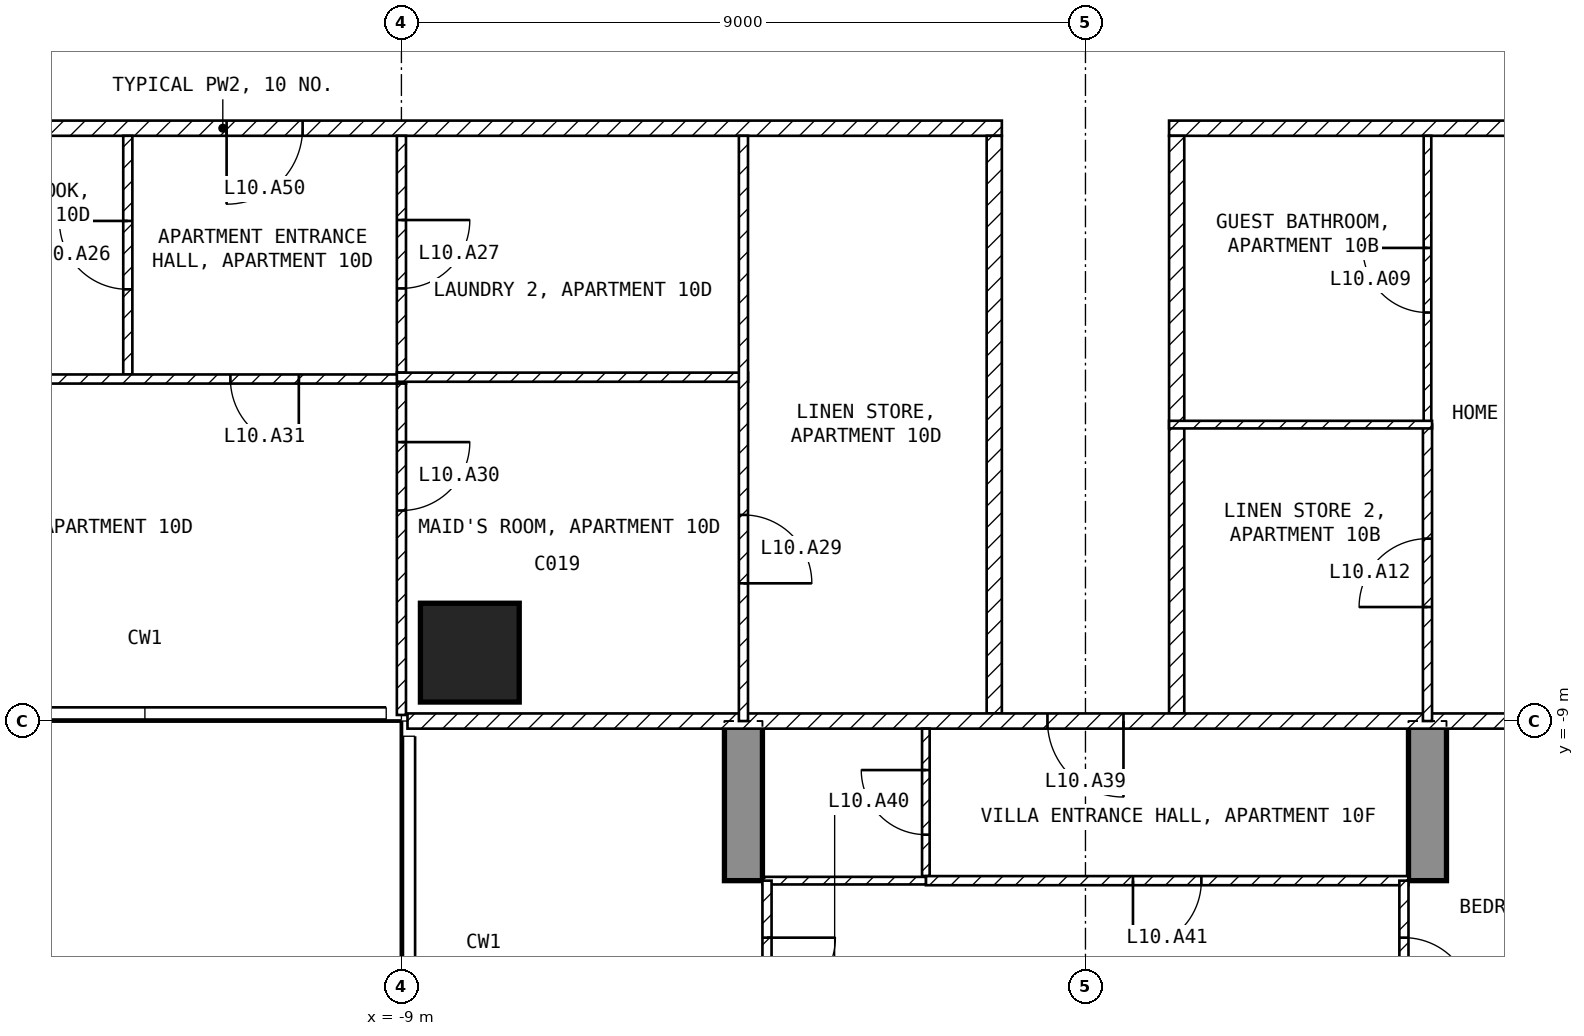
"""IFC4 building model, lengths in metres.
Left out: names, types, materials, properties, quantities, classifications, styles, units other than length and angle.
Written with IfcOpenShell. Run it as: python <this file> out.ifc"""

import sys

from ifc_helpers import new_model, si_unit, direction, frame, frame_2d, origin, origin_2d, place, context, subcontext, project, spatial, polyline, rectangle, outline, extrude, element, fill, save


model = new_model("IFC4")
c1 = context("Model", 3, precision=1e-05, world=origin(), true_north=direction((0.0, 1.0)))
c2 = subcontext(c1, "Body", "Model", "MODEL_VIEW")
j1 = project(units=[si_unit("LENGTHUNIT", "METRE"), si_unit("PLANEANGLEUNIT", "RADIAN")], contexts=[c1])
p1 = place(None, origin())
s1 = spatial("IfcSite", under=j1, at=p1, CompositionType="ELEMENT")
p2 = place(p1, origin())
s2 = spatial("IfcBuilding", under=s1, at=p2, CompositionType="ELEMENT")
p3 = place(p2, frame((0.0, 0.0, 54.0)))
s3 = spatial("IfcBuildingStorey", under=s2, at=p3, CompositionType="ELEMENT", Elevation=54.0)
p4 = place(p3, frame((-8.1, -8.1, -0.25), z_axis=(0.0, 0.0, 1.0), x_axis=(1.0, 0.0, 0.0)))
e1 = element("IfcColumn", 1, at=p4, inside=s3, PredefinedType="COLUMN", context=c2, shape_type="SweptSolid", body=[
    extrude(rectangle(XDim=1.3, YDim=1.3, at=origin_2d()), origin(), (0.0, 0.0, 1.0), 3.5),
])
for number, where, z_axis, x_axis in (
    (2, (-4.75, -25.45, -0.25), (1.0, 0.0, 0.0), (0.0, 1.0, 0.0)),
    (3, (4.25, -25.45, -0.25), (1.0, 0.0, 0.0), (0.0, 1.0, 0.0)),
):
    element("IfcWall", number, at=place(p3, frame(where, z_axis=z_axis, x_axis=x_axis)), inside=s3, PredefinedType="SHEAR", context=c2, shape_type="SweptSolid", body=[
        extrude(outline(polyline([(0.0, 0.0), (4.15, 0.0), (4.15, 2.65), (6.55, 2.65), (6.55, 0.0), (11.95, 0.0), (11.95, 2.65), (14.35, 2.65), (14.35, 0.0), (16.45, 0.0), (16.45, 3.5), (0.0, 3.5), (0.0, 0.0)])), origin(), (0.0, 0.0, 1.0), 0.5),
    ])
p5 = place(p3, frame((21.6, -1.2, 0.0), z_axis=(0.0, 0.0, 1.0), x_axis=(-1.0, 0.0, 0.0)))
e4 = element("IfcWall", 4, at=p5, inside=s3, PredefinedType="PARTITIONING", context=c2, shape_type="SweptSolid", body=[
    extrude(rectangle(XDim=20.5, YDim=0.2, at=frame_2d((10.25, 0.0))), origin(), (0.0, 0.0, 1.0), 3.25),
])
p6 = place(p5, frame((7.9, 0.0, 0.0)))
e5 = element("IfcOpeningElement", 5, at=p6, cuts=e4, PredefinedType="OPENING", context=c2, shape_type="SweptSolid", body=[
    extrude(rectangle(XDim=1.0, YDim=2.1, at=frame_2d((0.5, 1.05))), frame((0.0, 0.11, 0.0), z_axis=(0.0, -1.0, 0.0), x_axis=(1.0, 0.0, 0.0)), (0.0, 0.0, 1.0), 0.22),
])
p7 = place(p3, frame((1.2, -1.3, 0.0), z_axis=(0.0, 0.0, 1.0), x_axis=(0.0, -1.0, 0.0)))
e6 = element("IfcWall", 6, at=p7, inside=s3, PredefinedType="PARTITIONING", context=c2, shape_type="SweptSolid", body=[
    extrude(rectangle(XDim=7.6, YDim=0.2, at=frame_2d((3.8, 0.0))), origin(), (0.0, 0.0, 1.0), 3.25),
])
p8 = place(p3, frame((-1.1, -1.2, 0.0), z_axis=(0.0, 0.0, 1.0), x_axis=(-1.0, 0.0, 0.0)))
e7 = element("IfcWall", 7, at=p8, inside=s3, PredefinedType="PARTITIONING", context=c2, shape_type="SweptSolid", body=[
    extrude(rectangle(XDim=20.5, YDim=0.2, at=frame_2d((10.25, 0.0))), origin(), (0.0, 0.0, 1.0), 3.25),
])
p9 = place(p8, frame((9.2, 0.0, 0.0)))
e8 = element("IfcOpeningElement", 8, at=p9, cuts=e7, PredefinedType="OPENING", context=c2, shape_type="SweptSolid", body=[
    extrude(rectangle(XDim=1.0, YDim=2.1, at=frame_2d((0.5, 1.05))), frame((0.0, 0.11, 0.0), z_axis=(0.0, -1.0, 0.0), x_axis=(1.0, 0.0, 0.0)), (0.0, 0.0, 1.0), 0.22),
])
p10 = place(p3, frame((-1.2, -8.9, 0.0), z_axis=(0.0, 0.0, 1.0), x_axis=(0.0, 1.0, 0.0)))
e9 = element("IfcWall", 9, at=p10, inside=s3, PredefinedType="PARTITIONING", context=c2, shape_type="SweptSolid", body=[
    extrude(rectangle(XDim=7.6, YDim=0.2, at=frame_2d((3.8, 0.0))), origin(), (0.0, 0.0, 1.0), 3.25),
])
p11 = place(p3, frame((8.92, -9.0, 0.0), z_axis=(0.0, 0.0, 1.0), x_axis=(-1.0, 0.0, 0.0)))
e10 = element("IfcWall", 10, at=p11, inside=s3, PredefinedType="PARTITIONING", context=c2, shape_type="SweptSolid", body=[
    extrude(rectangle(XDim=17.84, YDim=0.2, at=frame_2d((8.92, 0.0))), origin(), (0.0, 0.0, 1.0), 3.25),
])
p12 = place(p11, frame((8.42, 0.0, 0.0)))
e11 = element("IfcOpeningElement", 11, at=p12, cuts=e10, PredefinedType="OPENING", context=c2, shape_type="SweptSolid", body=[
    extrude(rectangle(XDim=1.0, YDim=2.1, at=frame_2d((0.5, 1.05))), frame((0.0, 0.11, 0.0), z_axis=(0.0, -1.0, 0.0), x_axis=(1.0, 0.0, 0.0)), (0.0, 0.0, 1.0), 0.22),
])
p13 = place(p3, frame((4.5, -5.1, 0.0), z_axis=(0.0, 0.0, 1.0), x_axis=(0.0, 1.0, 0.0)))
e12 = element("IfcWall", 12, at=p13, inside=s3, PredefinedType="PARTITIONING", context=c2, shape_type="SweptSolid", body=[
    extrude(rectangle(XDim=3.8, YDim=0.1, at=frame_2d((1.9, 0.0))), origin(), (0.0, 0.0, 1.0), 3.25),
])
p14 = place(p13, frame((1.475, 0.0, 0.0)))
e13 = element("IfcOpeningElement", 13, at=p14, cuts=e12, PredefinedType="OPENING", context=c2, shape_type="SweptSolid", body=[
    extrude(rectangle(XDim=0.85, YDim=2.1, at=frame_2d((0.425, 1.05))), frame((0.0, 0.06, 0.0), z_axis=(0.0, -1.0, 0.0), x_axis=(1.0, 0.0, 0.0)), (0.0, 0.0, 1.0), 0.12),
])
p15 = place(p3, frame((4.5, -9.0, 0.0), z_axis=(0.0, 0.0, 1.0), x_axis=(0.0, 1.0, 0.0)))
e14 = element("IfcWall", 14, at=p15, inside=s3, PredefinedType="PARTITIONING", context=c2, shape_type="SweptSolid", body=[
    extrude(rectangle(XDim=3.9, YDim=0.12, at=frame_2d((1.95, 0.0))), origin(), (0.0, 0.0, 1.0), 3.25),
])
p16 = place(p15, frame((1.5, 0.0, 0.0)))
e15 = element("IfcOpeningElement", 15, at=p16, cuts=e14, PredefinedType="OPENING", context=c2, shape_type="SweptSolid", body=[
    extrude(rectangle(XDim=0.9, YDim=2.1, at=frame_2d((0.45, 1.05))), frame((0.0, 0.07, 0.0), z_axis=(0.0, -1.0, 0.0), x_axis=(1.0, 0.0, 0.0)), (0.0, 0.0, 1.0), 0.14),
])
p17 = place(p3, frame((4.56, -5.1, 0.0), z_axis=(0.0, 0.0, 1.0), x_axis=(-1.0, 0.0, 0.0)))
e16 = element("IfcWall", 16, at=p17, inside=s3, PredefinedType="PARTITIONING", context=c2, shape_type="SweptSolid", body=[
    extrude(rectangle(XDim=3.46, YDim=0.1, at=frame_2d((1.73, 0.0))), origin(), (0.0, 0.0, 1.0), 3.25),
])
p18 = place(p3, frame((-12.6, -4.44, 0.0), z_axis=(0.0, 0.0, 1.0), x_axis=(0.0, 1.0, 0.0)))
e17 = element("IfcWall", 17, at=p18, inside=s3, PredefinedType="PARTITIONING", context=c2, shape_type="SweptSolid", body=[
    extrude(rectangle(XDim=3.14, YDim=0.12, at=frame_2d((1.57, 0.0))), origin(), (0.0, 0.0, 1.0), 3.25),
])
p19 = place(p18, frame((1.12, 0.0, 0.0)))
e18 = element("IfcOpeningElement", 18, at=p19, cuts=e17, PredefinedType="OPENING", context=c2, shape_type="SweptSolid", body=[
    extrude(rectangle(XDim=0.9, YDim=2.1, at=frame_2d((0.45, 1.05))), frame((0.0, 0.07, 0.0), z_axis=(0.0, -1.0, 0.0), x_axis=(1.0, 0.0, 0.0)), (0.0, 0.0, 1.0), 0.14),
])
p20 = place(p3, frame((-8.94, -4.5, 0.0), z_axis=(0.0, 0.0, 1.0), x_axis=(-1.0, 0.0, 0.0)))
e19 = element("IfcWall", 19, at=p20, inside=s3, PredefinedType="PARTITIONING", context=c2, shape_type="SweptSolid", body=[
    extrude(rectangle(XDim=8.46, YDim=0.12, at=frame_2d((4.23, 0.0))), origin(), (0.0, 0.0, 1.0), 3.25),
])
p21 = place(p20, frame((7.11, 0.0, 0.0)))
e20 = element("IfcOpeningElement", 20, at=p21, cuts=e19, PredefinedType="OPENING", context=c2, shape_type="SweptSolid", body=[
    extrude(rectangle(XDim=0.9, YDim=2.1, at=frame_2d((0.45, 1.05))), frame((0.0, 0.07, 0.0), z_axis=(0.0, -1.0, 0.0), x_axis=(1.0, 0.0, 0.0)), (0.0, 0.0, 1.0), 0.14),
])
p22 = place(p20, frame((1.41, 0.0, 0.0)))
e21 = element("IfcOpeningElement", 21, at=p22, cuts=e19, PredefinedType="OPENING", context=c2, shape_type="SweptSolid", body=[
    extrude(rectangle(XDim=0.9, YDim=2.1, at=frame_2d((0.45, 1.05))), frame((0.0, 0.07, 0.0), z_axis=(0.0, -1.0, 0.0), x_axis=(1.0, 0.0, 0.0)), (0.0, 0.0, 1.0), 0.14),
])
p23 = place(p3, frame((-9.0, -1.3, 0.0), z_axis=(0.0, 0.0, 1.0), x_axis=(0.0, -1.0, 0.0)))
e22 = element("IfcWall", 22, at=p23, inside=s3, PredefinedType="PARTITIONING", context=c2, shape_type="SweptSolid", body=[
    extrude(rectangle(XDim=3.116, YDim=0.12, at=frame_2d((1.558, 0.0))), origin(), (0.0, 0.0, 1.0), 3.25),
])
p24 = place(p23, frame((1.108, 0.0, 0.0)))
e23 = element("IfcOpeningElement", 23, at=p24, cuts=e22, PredefinedType="OPENING", context=c2, shape_type="SweptSolid", body=[
    extrude(rectangle(XDim=0.9, YDim=2.1, at=frame_2d((0.45, 1.05))), frame((0.0, 0.07, 0.0), z_axis=(0.0, -1.0, 0.0), x_axis=(1.0, 0.0, 0.0)), (0.0, 0.0, 1.0), 0.14),
])
p25 = place(p3, frame((-9.0, -4.56, 0.0), z_axis=(0.0, 0.0, 1.0), x_axis=(0.0, -1.0, 0.0)))
e24 = element("IfcWall", 24, at=p25, inside=s3, PredefinedType="PARTITIONING", context=c2, shape_type="SweptSolid", body=[
    extrude(rectangle(XDim=4.36, YDim=0.12, at=frame_2d((2.18, 0.0))), origin(), (0.0, 0.0, 1.0), 3.25),
])
p26 = place(p25, frame((0.77, 0.0, 0.0)))
e25 = element("IfcOpeningElement", 25, at=p26, cuts=e24, PredefinedType="OPENING", context=c2, shape_type="SweptSolid", body=[
    extrude(rectangle(XDim=0.9, YDim=2.1, at=frame_2d((0.45, 1.05))), frame((0.0, 0.07, 0.0), z_axis=(0.0, -1.0, 0.0), x_axis=(1.0, 0.0, 0.0)), (0.0, 0.0, 1.0), 0.14),
])
p27 = place(p3, frame((-4.44, -4.476, 0.0), z_axis=(0.0, 0.0, 1.0), x_axis=(-1.0, 0.0, 0.0)))
e26 = element("IfcWall", 26, at=p27, inside=s3, PredefinedType="PARTITIONING", context=c2, shape_type="SweptSolid", body=[
    extrude(rectangle(XDim=4.62, YDim=0.12, at=frame_2d((2.31, 0.0))), origin(), (0.0, 0.0, 1.0), 3.25),
])
p28 = place(p3, frame((-4.5, -1.3, 0.0), z_axis=(0.0, 0.0, 1.0), x_axis=(0.0, -1.0, 0.0)))
e27 = element("IfcWall", 27, at=p28, inside=s3, PredefinedType="PARTITIONING", context=c2, shape_type="SweptSolid", body=[
    extrude(rectangle(XDim=7.7, YDim=0.12, at=frame_2d((3.85, 0.0))), origin(), (0.0, 0.0, 1.0), 3.25),
])
p29 = place(p28, frame((4.988, 0.0, 0.0)))
e28 = element("IfcOpeningElement", 28, at=p29, cuts=e27, PredefinedType="OPENING", context=c2, shape_type="SweptSolid", body=[
    extrude(rectangle(XDim=0.9, YDim=2.1, at=frame_2d((0.45, 1.05))), frame((0.0, 0.07, 0.0), z_axis=(0.0, -1.0, 0.0), x_axis=(1.0, 0.0, 0.0)), (0.0, 0.0, 1.0), 0.14),
])
p30 = place(p3, frame((-2.1, -11.04, 0.0), z_axis=(0.0, 0.0, 1.0), x_axis=(0.0, 1.0, 0.0)))
e29 = element("IfcWall", 29, at=p30, inside=s3, PredefinedType="PARTITIONING", context=c2, shape_type="SweptSolid", body=[
    extrude(rectangle(XDim=1.94, YDim=0.1, at=frame_2d((0.97, 0.0))), origin(), (0.0, 0.0, 1.0), 3.25),
])
p31 = place(p30, frame((0.545, 0.0, 0.0)))
e30 = element("IfcOpeningElement", 30, at=p31, cuts=e29, PredefinedType="OPENING", context=c2, shape_type="SweptSolid", body=[
    extrude(rectangle(XDim=0.85, YDim=2.1, at=frame_2d((0.425, 1.05))), frame((0.0, 0.06, 0.0), z_axis=(0.0, -1.0, 0.0), x_axis=(1.0, 0.0, 0.0)), (0.0, 0.0, 1.0), 0.12),
])
p32 = place(p3, frame((4.25, -11.1, 0.0), z_axis=(0.0, 0.0, 1.0), x_axis=(-1.0, 0.0, 0.0)))
e31 = element("IfcWall", 31, at=p32, inside=s3, PredefinedType="PARTITIONING", context=c2, shape_type="SweptSolid", body=[
    extrude(rectangle(XDim=6.35, YDim=0.12, at=frame_2d((3.175, 0.0))), origin(), (0.0, 0.0, 1.0), 3.25),
])
p33 = place(p32, frame((2.725, 0.0, 0.0)))
e32 = element("IfcOpeningElement", 32, at=p33, cuts=e31, PredefinedType="OPENING", context=c2, shape_type="SweptSolid", body=[
    extrude(rectangle(XDim=0.9, YDim=2.1, at=frame_2d((0.45, 1.05))), frame((0.0, 0.07, 0.0), z_axis=(0.0, -1.0, 0.0), x_axis=(1.0, 0.0, 0.0)), (0.0, 0.0, 1.0), 0.14),
])
p34 = place(p3, frame((-2.1, -11.1, 0.0), z_axis=(0.0, 0.0, 1.0), x_axis=(-1.0, 0.0, 0.0)))
e33 = element("IfcWall", 33, at=p34, inside=s3, PredefinedType="PARTITIONING", context=c2, shape_type="SweptSolid", body=[
    extrude(rectangle(XDim=2.15, YDim=0.1, at=frame_2d((1.075, 0.0))), origin(), (0.0, 0.0, 1.0), 3.25),
])
p35 = place(p3, frame((4.19, -11.1, 0.0), z_axis=(0.0, 0.0, 1.0), x_axis=(0.0, -1.0, 0.0)))
e34 = element("IfcWall", 34, at=p35, inside=s3, PredefinedType="PARTITIONING", context=c2, shape_type="SweptSolid", body=[
    extrude(rectangle(XDim=2.4, YDim=0.12, at=frame_2d((1.2, 0.0))), origin(), (0.0, 0.0, 1.0), 2.4),
])
p36 = place(p35, frame((0.75, 0.0, 0.0)))
e35 = element("IfcOpeningElement", 35, at=p36, cuts=e34, PredefinedType="OPENING", context=c2, shape_type="SweptSolid", body=[
    extrude(rectangle(XDim=0.9, YDim=2.1, at=frame_2d((0.45, 1.05))), frame((0.0, 0.07, 0.0), z_axis=(0.0, -1.0, 0.0), x_axis=(1.0, 0.0, 0.0)), (0.0, 0.0, 1.0), 0.14),
])
p37 = place(p3, frame((-4.19, -11.1, 0.0), z_axis=(0.0, 0.0, 1.0), x_axis=(0.0, -1.0, 0.0)))
e36 = element("IfcWall", 36, at=p37, inside=s3, PredefinedType="PARTITIONING", context=c2, shape_type="SweptSolid", body=[
    extrude(rectangle(XDim=2.4, YDim=0.12, at=frame_2d((1.2, 0.0))), origin(), (0.0, 0.0, 1.0), 2.4),
])
p38 = place(p37, frame((0.75, 0.0, 0.0)))
e37 = element("IfcOpeningElement", 37, at=p38, cuts=e36, PredefinedType="OPENING", context=c2, shape_type="SweptSolid", body=[
    extrude(rectangle(XDim=0.9, YDim=2.1, at=frame_2d((0.45, 1.05))), frame((0.0, 0.07, 0.0), z_axis=(0.0, -1.0, 0.0), x_axis=(1.0, 0.0, 0.0)), (0.0, 0.0, 1.0), 0.14),
])
p39 = place(p14, origin())
e38 = element("IfcDoor", 38, at=p39, inside=s3, OperationType="SINGLE_SWING_RIGHT", PredefinedType="DOOR", context=c2, shape_type="SweptSolid", body=[
    extrude(rectangle(XDim=0.85, YDim=2.1, at=frame_2d((0.425, 1.05))), frame((0.0, 0.025, 0.0), z_axis=(0.0, -1.0, 0.0), x_axis=(1.0, 0.0, 0.0)), (0.0, 0.0, 1.0), 0.05),
])
fill(e13, e38)
p40 = place(p16, origin())
e39 = element("IfcDoor", 39, at=p40, inside=s3, OperationType="SINGLE_SWING_LEFT", PredefinedType="DOOR", context=c2, shape_type="SweptSolid", body=[
    extrude(rectangle(XDim=0.9, YDim=2.1, at=frame_2d((0.45, 1.05))), frame((0.0, 0.025, 0.0), z_axis=(0.0, -1.0, 0.0), x_axis=(1.0, 0.0, 0.0)), (0.0, 0.0, 1.0), 0.05),
])
fill(e15, e39)
p41 = place(p19, origin())
e40 = element("IfcDoor", 40, at=p41, inside=s3, OperationType="SINGLE_SWING_RIGHT", PredefinedType="DOOR", context=c2, shape_type="SweptSolid", body=[
    extrude(rectangle(XDim=0.9, YDim=2.1, at=frame_2d((0.45, 1.05))), frame((0.0, 0.025, 0.0), z_axis=(0.0, -1.0, 0.0), x_axis=(1.0, 0.0, 0.0)), (0.0, 0.0, 1.0), 0.05),
])
fill(e18, e40)
p42 = place(p24, origin())
e41 = element("IfcDoor", 41, at=p42, inside=s3, OperationType="SINGLE_SWING_LEFT", PredefinedType="DOOR", context=c2, shape_type="SweptSolid", body=[
    extrude(rectangle(XDim=0.9, YDim=2.1, at=frame_2d((0.45, 1.05))), frame((0.0, 0.025, 0.0), z_axis=(0.0, -1.0, 0.0), x_axis=(1.0, 0.0, 0.0)), (0.0, 0.0, 1.0), 0.05),
])
fill(e23, e41)
p43 = place(p29, origin())
e42 = element("IfcDoor", 42, at=p43, inside=s3, OperationType="SINGLE_SWING_RIGHT", PredefinedType="DOOR", context=c2, shape_type="SweptSolid", body=[
    extrude(rectangle(XDim=0.9, YDim=2.1, at=frame_2d((0.45, 1.05))), frame((0.0, 0.025, 0.0), z_axis=(0.0, -1.0, 0.0), x_axis=(1.0, 0.0, 0.0)), (0.0, 0.0, 1.0), 0.05),
])
fill(e28, e42)
p44 = place(p26, origin())
e43 = element("IfcDoor", 43, at=p44, inside=s3, OperationType="SINGLE_SWING_LEFT", PredefinedType="DOOR", context=c2, shape_type="SweptSolid", body=[
    extrude(rectangle(XDim=0.9, YDim=2.1, at=frame_2d((0.45, 1.05))), frame((0.0, 0.025, 0.0), z_axis=(0.0, -1.0, 0.0), x_axis=(1.0, 0.0, 0.0)), (0.0, 0.0, 1.0), 0.05),
])
fill(e25, e43)
p45 = place(p22, origin())
e44 = element("IfcDoor", 44, at=p45, inside=s3, OperationType="SINGLE_SWING_LEFT", PredefinedType="DOOR", context=c2, shape_type="SweptSolid", body=[
    extrude(rectangle(XDim=0.9, YDim=2.1, at=frame_2d((0.45, 1.05))), frame((0.0, 0.025, 0.0), z_axis=(0.0, -1.0, 0.0), x_axis=(1.0, 0.0, 0.0)), (0.0, 0.0, 1.0), 0.05),
])
fill(e21, e44)
p46 = place(p12, origin())
e45 = element("IfcDoor", 45, at=p46, inside=s3, OperationType="SINGLE_SWING_LEFT", PredefinedType="DOOR", context=c2, shape_type="SweptSolid", body=[
    extrude(rectangle(XDim=1.0, YDim=2.1, at=frame_2d((0.5, 1.05))), frame((0.0, 0.025, 0.0), z_axis=(0.0, -1.0, 0.0), x_axis=(1.0, 0.0, 0.0)), (0.0, 0.0, 1.0), 0.05),
])
fill(e11, e45)
p47 = place(p31, origin())
e46 = element("IfcDoor", 46, at=p47, inside=s3, OperationType="SINGLE_SWING_RIGHT", PredefinedType="DOOR", context=c2, shape_type="SweptSolid", body=[
    extrude(rectangle(XDim=0.85, YDim=2.1, at=frame_2d((0.425, 1.05))), frame((0.0, 0.025, 0.0), z_axis=(0.0, -1.0, 0.0), x_axis=(1.0, 0.0, 0.0)), (0.0, 0.0, 1.0), 0.05),
])
fill(e30, e46)
p48 = place(p33, origin())
e47 = element("IfcDoor", 47, at=p48, inside=s3, OperationType="SINGLE_SWING_RIGHT", PredefinedType="DOOR", context=c2, shape_type="SweptSolid", body=[
    extrude(rectangle(XDim=0.9, YDim=2.1, at=frame_2d((0.45, 1.05))), frame((0.0, 0.025, 0.0), z_axis=(0.0, -1.0, 0.0), x_axis=(1.0, 0.0, 0.0)), (0.0, 0.0, 1.0), 0.05),
])
fill(e32, e47)
p49 = place(p9, origin())
e48 = element("IfcDoor", 48, at=p49, inside=s3, OperationType="SINGLE_SWING_RIGHT", PredefinedType="DOOR", context=c2, shape_type="SweptSolid", body=[
    extrude(rectangle(XDim=1.0, YDim=2.1, at=frame_2d((0.5, 1.05))), frame((0.0, 0.025, 0.0), z_axis=(0.0, -1.0, 0.0), x_axis=(1.0, 0.0, 0.0)), (0.0, 0.0, 1.0), 0.05),
])
fill(e8, e48)
p50 = place(p36, origin())
e49 = element("IfcDoor", 49, at=p50, inside=s3, OperationType="SINGLE_SWING_RIGHT", PredefinedType="DOOR", context=c2, shape_type="SweptSolid", body=[
    extrude(rectangle(XDim=0.9, YDim=2.1, at=frame_2d((0.45, 1.05))), frame((0.0, 0.025, 0.0), z_axis=(0.0, -1.0, 0.0), x_axis=(1.0, 0.0, 0.0)), (0.0, 0.0, 1.0), 0.05),
])
fill(e35, e49)
p51 = place(p38, origin())
e50 = element("IfcDoor", 50, at=p51, inside=s3, OperationType="SINGLE_SWING_LEFT", PredefinedType="DOOR", context=c2, shape_type="SweptSolid", body=[
    extrude(rectangle(XDim=0.9, YDim=2.1, at=frame_2d((0.45, 1.05))), frame((0.0, 0.025, 0.0), z_axis=(0.0, -1.0, 0.0), x_axis=(1.0, 0.0, 0.0)), (0.0, 0.0, 1.0), 0.05),
])
fill(e37, e50)
save(model, sys.argv[1])
